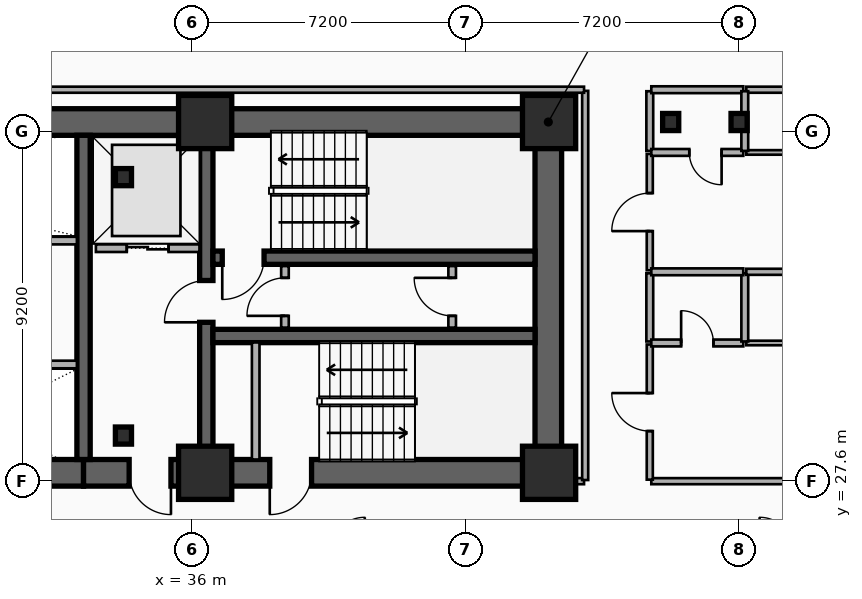
"""IFC4 building model, lengths in metres.
Left out: names, types, materials, properties, quantities, classifications, styles, units other than length and angle.
Written with IfcOpenShell. Run it as: python <this file> out.ifc"""

import sys

from ifc_helpers import new_model, si_unit, direction, frame, frame_2d, origin, origin_2d, place, context, subcontext, project, spatial, rectangle, i_section, extrude, element, fill, save


model = new_model("IFC4")
c1 = context("Model", 3, precision=1e-05, world=origin(), true_north=direction((0.0, 1.0)))
c2 = subcontext(c1, "Body", "Model", "MODEL_VIEW")
j1 = project(units=[si_unit("LENGTHUNIT", "METRE"), si_unit("PLANEANGLEUNIT", "RADIAN")], contexts=[c1])
p1 = place(None, origin())
s1 = spatial("IfcSite", under=j1, at=p1, CompositionType="ELEMENT")
p2 = place(p1, origin())
s2 = spatial("IfcBuilding", under=s1, at=p2, CompositionType="ELEMENT")
p3 = place(p2, frame((0.0, 0.0, 46.5)))
s3 = spatial("IfcBuildingStorey", under=s2, at=p3, CompositionType="ELEMENT", Elevation=46.5)
p4 = place(p3, frame((12.15, 37.05, 0.0), z_axis=(0.0, 0.0, 1.0), x_axis=(1.0, 0.0, 0.0)))
e1 = element("IfcWall", 1, at=p4, inside=s3, PredefinedType="SHEAR", context=c2, shape_type="SweptSolid", body=[
    extrude(rectangle(XDim=33.23, YDim=0.7, at=frame_2d((16.615, 0.0))), origin(), (0.0, 0.0, 1.0), 3.5),
])
p5 = place(p3, frame((33.15, 27.82, 0.0), z_axis=(0.0, 0.0, 1.0), x_axis=(-1.0, 0.0, 0.0)))
e2 = element("IfcWall", 2, at=p5, inside=s3, PredefinedType="SHEAR", context=c2, shape_type="SweptSolid", body=[
    extrude(rectangle(XDim=11.97, YDim=0.7, at=frame_2d((5.985, 0.0))), origin(), (0.0, 0.0, 1.0), 3.5),
])
p6 = place(p5, frame((6.1, 0.0, 0.0)))
e3 = element("IfcOpeningElement", 3, at=p6, cuts=e2, PredefinedType="OPENING", context=c2, shape_type="SweptSolid", body=[
    extrude(rectangle(XDim=1.6, YDim=2.2, at=frame_2d((0.8, 1.1))), frame((0.0, 0.36, 0.0), z_axis=(0.0, -1.0, 0.0), x_axis=(1.0, 0.0, 0.0)), (0.0, 0.0, 1.0), 0.72),
])
p7 = place(p3, frame((45.38, 27.82, 0.0), z_axis=(0.0, 0.0, 1.0), x_axis=(-1.0, 0.0, 0.0)))
e4 = element("IfcWall", 4, at=p7, inside=s3, PredefinedType="SHEAR", context=c2, shape_type="SweptSolid", body=[
    extrude(rectangle(XDim=12.23, YDim=0.7, at=frame_2d((6.115, 0.0))), origin(), (0.0, 0.0, 1.0), 3.5),
])
p8 = place(p7, frame((9.93, 0.0, 0.0)))
e5 = element("IfcOpeningElement", 5, at=p8, cuts=e4, PredefinedType="OPENING", context=c2, shape_type="SweptSolid", body=[
    extrude(rectangle(XDim=1.1, YDim=2.15, at=frame_2d((0.55, 1.075))), frame((0.0, 0.36, 0.0), z_axis=(0.0, -1.0, 0.0), x_axis=(1.0, 0.0, 0.0)), (0.0, 0.0, 1.0), 0.72),
])
p9 = place(p7, frame((6.23, 0.0, 0.0)))
e6 = element("IfcOpeningElement", 6, at=p9, cuts=e4, PredefinedType="OPENING", context=c2, shape_type="SweptSolid", body=[
    extrude(rectangle(XDim=1.1, YDim=2.15, at=frame_2d((0.55, 1.075))), frame((0.0, 0.36, 0.0), z_axis=(0.0, -1.0, 0.0), x_axis=(1.0, 0.0, 0.0)), (0.0, 0.0, 1.0), 0.72),
])
p10 = place(p3, frame((45.38, 28.17, 0.0), z_axis=(0.0, 0.0, 1.0), x_axis=(0.0, 1.0, 0.0)))
e7 = element("IfcWall", 7, at=p10, inside=s3, PredefinedType="SHEAR", context=c2, shape_type="SweptSolid", body=[
    extrude(rectangle(XDim=8.53, YDim=0.7, at=frame_2d((4.265, 0.0))), origin(), (0.0, 0.0, 1.0), 3.5),
])
p11 = place(p3, frame((33.15, 28.17, 0.0), z_axis=(0.0, 0.0, 1.0), x_axis=(0.0, 1.0, 0.0)))
e8 = element("IfcWall", 8, at=p11, inside=s3, PredefinedType="SHEAR", context=c2, shape_type="SweptSolid", body=[
    extrude(rectangle(XDim=8.53, YDim=0.35, at=frame_2d((4.265, 0.0))), origin(), (0.0, 0.0, 1.0), 3.5),
])
p12 = place(p3, frame((36.38, 28.17, 0.0), z_axis=(0.0, 0.0, 1.0), x_axis=(0.0, 1.0, 0.0)))
e9 = element("IfcWall", 9, at=p12, inside=s3, PredefinedType="SHEAR", context=c2, shape_type="SweptSolid", body=[
    extrude(rectangle(XDim=8.53, YDim=0.35, at=frame_2d((4.265, 0.0))), origin(), (0.0, 0.0, 1.0), 3.5),
])
p13 = place(p12, frame((3.61, 0.0, 0.0)))
e10 = element("IfcOpeningElement", 10, at=p13, cuts=e9, PredefinedType="OPENING", context=c2, shape_type="SweptSolid", body=[
    extrude(rectangle(XDim=1.1, YDim=2.15, at=frame_2d((0.55, 1.075))), frame((0.0, 0.185, 0.0), z_axis=(0.0, -1.0, 0.0), x_axis=(1.0, 0.0, 0.0)), (0.0, 0.0, 1.0), 0.37),
])
p14 = place(p3, frame((45.03, 33.48, 0.0), z_axis=(0.0, 0.0, 1.0), x_axis=(-1.0, 0.0, 0.0)))
e11 = element("IfcWall", 11, at=p14, inside=s3, PredefinedType="SHEAR", context=c2, shape_type="SweptSolid", body=[
    extrude(rectangle(XDim=8.475, YDim=0.35, at=frame_2d((4.238, 0.0))), origin(), (0.0, 0.0, 1.0), 3.5),
])
p15 = place(p14, frame((7.13, 0.0, 0.0)))
e12 = element("IfcOpeningElement", 12, at=p15, cuts=e11, PredefinedType="OPENING", context=c2, shape_type="SweptSolid", body=[
    extrude(rectangle(XDim=1.1, YDim=2.15, at=frame_2d((0.55, 1.075))), frame((0.0, 0.185, 0.0), z_axis=(0.0, -1.0, 0.0), x_axis=(1.0, 0.0, 0.0)), (0.0, 0.0, 1.0), 0.37),
])
p16 = place(p3, frame((36.555, 31.42, 0.0), z_axis=(0.0, 0.0, 1.0), x_axis=(1.0, 0.0, 0.0)))
e13 = element("IfcWall", 13, at=p16, inside=s3, PredefinedType="SHEAR", context=c2, shape_type="SweptSolid", body=[
    extrude(rectangle(XDim=8.475, YDim=0.35, at=frame_2d((4.238, 0.0))), origin(), (0.0, 0.0, 1.0), 3.5),
])
for number, where, z_axis, x_axis in (
    (14, (34.2, 28.8, 0.0), (0.0, 0.0, 1.0), (1.0, 0.0, 0.0)),
    (15, (34.2, 35.6, 0.0), (0.0, 0.0, 1.0), (1.0, 0.0, 0.0)),
):
    element("IfcColumn", number, at=place(p3, frame(where, z_axis=z_axis, x_axis=x_axis)), inside=s3, PredefinedType="COLUMN", context=c2, shape_type="SweptSolid", body=[
        extrude(i_section(OverallWidth=0.424, OverallDepth=0.45, WebThickness=0.041, FlangeThickness=0.065, FilletRadius=0.015, at=origin_2d()), origin(), (0.0, 0.0, 1.0), 3.5),
    ])
for number, where, z_axis, x_axis in (
    (16, (36.35, 27.82, 0.0), (0.0, 0.0, 1.0), (1.0, 0.0, 0.0)),
    (17, (36.35, 37.05, 0.0), (0.0, 0.0, 1.0), (1.0, 0.0, 0.0)),
    (18, (45.4, 27.82, 0.0), (0.0, 0.0, 1.0), (1.0, 0.0, 0.0)),
    (19, (45.4, 37.05, 0.0), (0.0, 0.0, 1.0), (1.0, 0.0, 0.0)),
):
    element("IfcColumn", number, at=place(p3, frame(where, z_axis=z_axis, x_axis=x_axis)), inside=s3, PredefinedType="COLUMN", context=c2, shape_type="SweptSolid", body=[
        extrude(rectangle(XDim=1.4, YDim=1.4, at=origin_2d()), origin(), (0.0, 0.0, 1.0), 3.5),
    ])
for number, where, z_axis, x_axis in (
    (20, (48.6, 37.05, 0.0), (0.0, 0.0, 1.0), (1.0, 0.0, 0.0)),
    (21, (50.4, 37.05, 0.0), (0.0, 0.0, 1.0), (1.0, 0.0, 0.0)),
):
    element("IfcColumn", number, at=place(p3, frame(where, z_axis=z_axis, x_axis=x_axis)), inside=s3, PredefinedType="COLUMN", context=c2, shape_type="SweptSolid", body=[
        extrude(i_section(OverallWidth=0.424, OverallDepth=0.45, WebThickness=0.041, FlangeThickness=0.065, FilletRadius=0.015, at=origin_2d()), origin(), (0.0, 0.0, 1.0), 3.5),
    ])
p17 = place(p3, frame((33.475, 33.73, 0.0), z_axis=(0.0, 0.0, 1.0), x_axis=(1.0, 0.0, 0.0)))
e22 = element("IfcWall", 22, at=p17, inside=s3, PredefinedType="PARTITIONING", context=c2, shape_type="SweptSolid", body=[
    extrude(rectangle(XDim=2.725, YDim=0.2, at=frame_2d((1.362, 0.0))), origin(), (0.0, 0.0, 1.0), 2.212),
])
p18 = place(p17, frame((0.812, 0.0, 0.0)))
e23 = element("IfcOpeningElement", 23, at=p18, cuts=e22, PredefinedType="OPENING", context=c2, shape_type="SweptSolid", body=[
    extrude(rectangle(XDim=1.1, YDim=2.15, at=frame_2d((0.55, 1.075))), frame((0.0, 0.11, 0.0), z_axis=(0.0, -1.0, 0.0), x_axis=(1.0, 0.0, 0.0)), (0.0, 0.0, 1.0), 0.22),
])
p19 = place(p3, frame((31.775, 30.67, 0.0), z_axis=(0.0, 0.0, 1.0), x_axis=(1.0, 0.0, 0.0)))
e24 = element("IfcWall", 24, at=p19, inside=s3, PredefinedType="PARTITIONING", context=c2, shape_type="SweptSolid", body=[
    extrude(rectangle(XDim=1.2, YDim=0.2, at=frame_2d((0.6, 0.0))), origin(), (0.0, 0.0, 1.0), 2.62),
])
p20 = place(p3, frame((31.775, 33.93, 0.0), z_axis=(0.0, 0.0, 1.0), x_axis=(1.0, 0.0, 0.0)))
e25 = element("IfcWall", 25, at=p20, inside=s3, PredefinedType="PARTITIONING", context=c2, shape_type="SweptSolid", body=[
    extrude(rectangle(XDim=1.2, YDim=0.2, at=frame_2d((0.6, 0.0))), origin(), (0.0, 0.0, 1.0), 3.24),
])
p21 = place(p3, frame((37.68, 28.17, 0.0), z_axis=(0.0, 0.0, 1.0), x_axis=(0.0, 1.0, 0.0)))
e26 = element("IfcWall", 26, at=p21, inside=s3, PredefinedType="PARTITIONING", context=c2, shape_type="SweptSolid", body=[
    extrude(rectangle(XDim=3.08, YDim=0.2, at=frame_2d((1.54, 0.0))), origin(), (0.0, 0.0, 1.0), 2.62),
])
p22 = place(p3, frame((38.45, 31.64, 0.0), z_axis=(0.0, 0.0, 1.0), x_axis=(0.0, 1.0, 0.0)))
e27 = element("IfcWall", 27, at=p22, inside=s3, PredefinedType="PARTITIONING", context=c2, shape_type="SweptSolid", body=[
    extrude(rectangle(XDim=1.62, YDim=0.2, at=frame_2d((0.81, 0.0))), origin(), (0.0, 0.0, 1.0), 3.24),
])
p23 = place(p22, frame((0.31, 0.0, 0.0)))
e28 = element("IfcOpeningElement", 28, at=p23, cuts=e27, PredefinedType="OPENING", context=c2, shape_type="SweptSolid", body=[
    extrude(rectangle(XDim=1.0, YDim=2.15, at=frame_2d((0.5, 1.075))), frame((0.0, 0.11, 0.0), z_axis=(0.0, -1.0, 0.0), x_axis=(1.0, 0.0, 0.0)), (0.0, 0.0, 1.0), 0.22),
])
p24 = place(p3, frame((42.85, 31.64, 0.0), z_axis=(0.0, 0.0, 1.0), x_axis=(0.0, 1.0, 0.0)))
e29 = element("IfcWall", 29, at=p24, inside=s3, PredefinedType="PARTITIONING", context=c2, shape_type="SweptSolid", body=[
    extrude(rectangle(XDim=1.62, YDim=0.2, at=frame_2d((0.81, 0.0))), origin(), (0.0, 0.0, 1.0), 3.24),
])
p25 = place(p24, frame((0.31, 0.0, 0.0)))
e30 = element("IfcOpeningElement", 30, at=p25, cuts=e29, PredefinedType="OPENING", context=c2, shape_type="SweptSolid", body=[
    extrude(rectangle(XDim=1.0, YDim=2.15, at=frame_2d((0.5, 1.075))), frame((0.0, 0.11, 0.0), z_axis=(0.0, -1.0, 0.0), x_axis=(1.0, 0.0, 0.0)), (0.0, 0.0, 1.0), 0.22),
])
p26 = place(p3, frame((48.09, 27.6, 0.0), z_axis=(0.0, 0.0, 1.0), x_axis=(1.0, 0.0, 0.0)))
e31 = element("IfcWall", 31, at=p26, inside=s3, PredefinedType="PARTITIONING", context=c2, shape_type="SweptSolid", body=[
    extrude(rectangle(XDim=9.25, YDim=0.16, at=frame_2d((4.625, 0.0))), origin(), (0.0, 0.0, 1.0), 2.57),
])
p27 = place(p26, frame((4.125, 0.0, 0.0)))
e32 = element("IfcOpeningElement", 32, at=p27, cuts=e31, PredefinedType="OPENING", context=c2, shape_type="SweptSolid", body=[
    extrude(rectangle(XDim=1.0, YDim=2.15, at=frame_2d((0.5, 1.075))), frame((0.0, 0.09, 0.0), z_axis=(0.0, -1.0, 0.0), x_axis=(1.0, 0.0, 0.0)), (0.0, 0.0, 1.0), 0.18),
])
p28 = place(p3, frame((48.05, 27.64, 0.0), z_axis=(0.0, 0.0, 1.0), x_axis=(0.0, 1.0, 0.0)))
e33 = element("IfcWall", 33, at=p28, inside=s3, PredefinedType="PARTITIONING", context=c2, shape_type="SweptSolid", body=[
    extrude(rectangle(XDim=3.556, YDim=0.16, at=frame_2d((1.778, 0.0))), origin(), (0.0, 0.0, 1.0), 3.24),
])
p29 = place(p28, frame((1.278, 0.0, 0.0)))
e34 = element("IfcOpeningElement", 34, at=p29, cuts=e33, PredefinedType="OPENING", context=c2, shape_type="SweptSolid", body=[
    extrude(rectangle(XDim=1.0, YDim=2.15, at=frame_2d((0.5, 1.075))), frame((0.0, 0.09, 0.0), z_axis=(0.0, -1.0, 0.0), x_axis=(1.0, 0.0, 0.0)), (0.0, 0.0, 1.0), 0.18),
])
p30 = place(p3, frame((48.05, 31.276, 0.0), z_axis=(0.0, 0.0, 1.0), x_axis=(0.0, 1.0, 0.0)))
e35 = element("IfcWall", 35, at=p30, inside=s3, PredefinedType="PLUMBINGWALL", context=c2, shape_type="SweptSolid", body=[
    extrude(rectangle(XDim=1.793, YDim=0.18, at=frame_2d((0.896, 0.0))), origin(), (0.0, 0.0, 1.0), 3.24),
])
p31 = place(p3, frame((48.05, 33.149, 0.0), z_axis=(0.0, 0.0, 1.0), x_axis=(0.0, 1.0, 0.0)))
e36 = element("IfcWall", 36, at=p31, inside=s3, PredefinedType="PARTITIONING", context=c2, shape_type="SweptSolid", body=[
    extrude(rectangle(XDim=3.061, YDim=0.16, at=frame_2d((1.531, 0.0))), origin(), (0.0, 0.0, 1.0), 3.24),
])
p32 = place(p31, frame((1.031, 0.0, 0.0)))
e37 = element("IfcOpeningElement", 37, at=p32, cuts=e36, PredefinedType="OPENING", context=c2, shape_type="SweptSolid", body=[
    extrude(rectangle(XDim=1.0, YDim=2.15, at=frame_2d((0.5, 1.075))), frame((0.0, 0.09, 0.0), z_axis=(0.0, -1.0, 0.0), x_axis=(1.0, 0.0, 0.0)), (0.0, 0.0, 1.0), 0.18),
])
p33 = place(p3, frame((48.05, 36.29, 0.0), z_axis=(0.0, 0.0, 1.0), x_axis=(0.0, 1.0, 0.0)))
e38 = element("IfcWall", 38, at=p33, inside=s3, PredefinedType="PLUMBINGWALL", context=c2, shape_type="SweptSolid", body=[
    extrude(rectangle(XDim=1.57, YDim=0.18, at=frame_2d((0.785, 0.0))), origin(), (0.0, 0.0, 1.0), 2.72),
])
p34 = place(p3, frame((48.09, 37.9, 0.0), z_axis=(0.0, 0.0, 1.0), x_axis=(1.0, 0.0, 0.0)))
e39 = element("IfcWall", 39, at=p34, inside=s3, PredefinedType="PLUMBINGWALL", context=c2, shape_type="SweptSolid", body=[
    extrude(rectangle(XDim=2.42, YDim=0.18, at=frame_2d((1.21, 0.0))), origin(), (0.0, 0.0, 1.0), 3.24),
])
p35 = place(p3, frame((50.59, 37.9, 0.0), z_axis=(0.0, 0.0, 1.0), x_axis=(1.0, 0.0, 0.0)))
e40 = element("IfcWall", 40, at=p35, inside=s3, PredefinedType="PARTITIONING", context=c2, shape_type="SweptSolid", body=[
    extrude(rectangle(XDim=6.75, YDim=0.16, at=frame_2d((3.375, 0.0))), origin(), (0.0, 0.0, 1.0), 3.24),
])
p36 = place(p3, frame((48.09, 31.236, 0.0), z_axis=(0.0, 0.0, 1.0), x_axis=(1.0, 0.0, 0.0)))
e41 = element("IfcWall", 41, at=p36, inside=s3, PredefinedType="PLUMBINGWALL", context=c2, shape_type="SweptSolid", body=[
    extrude(rectangle(XDim=2.42, YDim=0.18, at=frame_2d((1.21, 0.0))), origin(), (0.0, 0.0, 1.0), 2.57),
])
p37 = place(p36, frame((0.785, 0.0, 0.0)))
e42 = element("IfcOpeningElement", 42, at=p37, cuts=e41, PredefinedType="OPENING", context=c2, shape_type="SweptSolid", body=[
    extrude(rectangle(XDim=0.85, YDim=2.1, at=frame_2d((0.425, 1.05))), frame((0.0, 0.1, 0.0), z_axis=(0.0, -1.0, 0.0), x_axis=(1.0, 0.0, 0.0)), (0.0, 0.0, 1.0), 0.2),
])
p38 = place(p3, frame((50.59, 31.236, 0.0), z_axis=(0.0, 0.0, 1.0), x_axis=(1.0, 0.0, 0.0)))
e43 = element("IfcWall", 43, at=p38, inside=s3, PredefinedType="PARTITIONING", context=c2, shape_type="SweptSolid", body=[
    extrude(rectangle(XDim=6.75, YDim=0.12, at=frame_2d((3.375, 0.0))), origin(), (0.0, 0.0, 1.0), 2.57),
])
p39 = place(p38, frame((2.925, 0.0, 0.0)))
e44 = element("IfcOpeningElement", 44, at=p39, cuts=e43, PredefinedType="OPENING", context=c2, shape_type="SweptSolid", body=[
    extrude(rectangle(XDim=0.9, YDim=2.1, at=frame_2d((0.45, 1.05))), frame((0.0, 0.07, 0.0), z_axis=(0.0, -1.0, 0.0), x_axis=(1.0, 0.0, 0.0)), (0.0, 0.0, 1.0), 0.14),
])
p40 = place(p3, frame((50.55, 31.276, 0.0), z_axis=(0.0, 0.0, 1.0), x_axis=(0.0, 1.0, 0.0)))
e45 = element("IfcWall", 45, at=p40, inside=s3, PredefinedType="PLUMBINGWALL", context=c2, shape_type="SweptSolid", body=[
    extrude(rectangle(XDim=1.793, YDim=0.18, at=frame_2d((0.896, 0.0))), origin(), (0.0, 0.0, 1.0), 2.57),
])
p41 = place(p3, frame((48.09, 33.109, 0.0), z_axis=(0.0, 0.0, 1.0), x_axis=(1.0, 0.0, 0.0)))
e46 = element("IfcWall", 46, at=p41, inside=s3, PredefinedType="PLUMBINGWALL", context=c2, shape_type="SweptSolid", body=[
    extrude(rectangle(XDim=2.42, YDim=0.18, at=frame_2d((1.21, 0.0))), origin(), (0.0, 0.0, 1.0), 2.57),
])
p42 = place(p3, frame((50.59, 33.109, 0.0), z_axis=(0.0, 0.0, 1.0), x_axis=(1.0, 0.0, 0.0)))
e47 = element("IfcWall", 47, at=p42, inside=s3, PredefinedType="PARTITIONING", context=c2, shape_type="SweptSolid", body=[
    extrude(rectangle(XDim=6.75, YDim=0.16, at=frame_2d((3.375, 0.0))), origin(), (0.0, 0.0, 1.0), 2.57),
])
p43 = place(p3, frame((50.51, 36.25, 0.0), z_axis=(0.0, 0.0, 1.0), x_axis=(-1.0, 0.0, 0.0)))
e48 = element("IfcWall", 48, at=p43, inside=s3, PredefinedType="PLUMBINGWALL", context=c2, shape_type="SweptSolid", body=[
    extrude(rectangle(XDim=2.42, YDim=0.18, at=frame_2d((1.21, 0.0))), origin(), (0.0, 0.0, 1.0), 2.57),
])
p44 = place(p43, frame((0.57, 0.0, 0.0)))
e49 = element("IfcOpeningElement", 49, at=p44, cuts=e48, PredefinedType="OPENING", context=c2, shape_type="SweptSolid", body=[
    extrude(rectangle(XDim=0.85, YDim=2.1, at=frame_2d((0.425, 1.05))), frame((0.0, 0.1, 0.0), z_axis=(0.0, -1.0, 0.0), x_axis=(1.0, 0.0, 0.0)), (0.0, 0.0, 1.0), 0.2),
])
p45 = place(p3, frame((50.59, 36.25, 0.0), z_axis=(0.0, 0.0, 1.0), x_axis=(1.0, 0.0, 0.0)))
e50 = element("IfcWall", 50, at=p45, inside=s3, PredefinedType="PARTITIONING", context=c2, shape_type="SweptSolid", body=[
    extrude(rectangle(XDim=6.75, YDim=0.12, at=frame_2d((3.375, 0.0))), origin(), (0.0, 0.0, 1.0), 2.57),
])
p46 = place(p45, frame((2.925, 0.0, 0.0)))
e51 = element("IfcOpeningElement", 51, at=p46, cuts=e50, PredefinedType="OPENING", context=c2, shape_type="SweptSolid", body=[
    extrude(rectangle(XDim=0.9, YDim=2.1, at=frame_2d((0.45, 1.05))), frame((0.0, 0.07, 0.0), z_axis=(0.0, -1.0, 0.0), x_axis=(1.0, 0.0, 0.0)), (0.0, 0.0, 1.0), 0.14),
])
p47 = place(p3, frame((50.55, 36.29, 0.0), z_axis=(0.0, 0.0, 1.0), x_axis=(0.0, 1.0, 0.0)))
e52 = element("IfcWall", 52, at=p47, inside=s3, PredefinedType="PLUMBINGWALL", context=c2, shape_type="SweptSolid", body=[
    extrude(rectangle(XDim=1.57, YDim=0.18, at=frame_2d((0.785, 0.0))), origin(), (0.0, 0.0, 1.0), 2.57),
])
p48 = place(p3, frame((45.41, 27.6, 0.0), z_axis=(0.0, 0.0, 1.0), x_axis=(1.0, 0.0, 0.0)))
e53 = element("IfcWall", 53, at=p48, inside=s3, PredefinedType="PARTITIONING", context=c2, shape_type="SweptSolid", body=[
    extrude(rectangle(XDim=0.91, YDim=0.16, at=frame_2d((0.455, 0.0))), origin(), (0.0, 0.0, 1.0), 2.28),
])
p49 = place(p3, frame((46.35, 27.63, 0.0), z_axis=(0.0, 0.0, 1.0), x_axis=(0.0, 1.0, 0.0)))
e54 = element("IfcWall", 54, at=p49, inside=s3, PredefinedType="PARTITIONING", context=c2, shape_type="SweptSolid", body=[
    extrude(rectangle(XDim=10.24, YDim=0.16, at=frame_2d((5.12, 0.0))), origin(), (0.0, 0.0, 1.0), 2.72),
])
p50 = place(p3, frame((11.28, 37.9, 0.0), z_axis=(0.0, 0.0, 1.0), x_axis=(1.0, 0.0, 0.0)))
e55 = element("IfcWall", 55, at=p50, inside=s3, PredefinedType="PARTITIONING", context=c2, shape_type="SweptSolid", body=[
    extrude(rectangle(XDim=35.04, YDim=0.16, at=frame_2d((17.52, 0.0))), origin(), (0.0, 0.0, 1.0), 3.24),
])
p51 = place(p18, origin())
e56 = element("IfcDoor", 56, at=p51, inside=s3, OperationType="DOUBLE_DOOR_SLIDING", PredefinedType="DOOR", context=c2, shape_type="SweptSolid", body=[
    extrude(rectangle(XDim=1.1, YDim=2.15, at=frame_2d((0.55, 1.075))), frame((0.0, 0.025, 0.0), z_axis=(0.0, -1.0, 0.0), x_axis=(1.0, 0.0, 0.0)), (0.0, 0.0, 1.0), 0.05),
])
fill(e23, e56)
p52 = place(p15, origin())
e57 = element("IfcDoor", 57, at=p52, inside=s3, OperationType="SINGLE_SWING_RIGHT", PredefinedType="DOOR", context=c2, shape_type="SweptSolid", body=[
    extrude(rectangle(XDim=1.1, YDim=2.15, at=frame_2d((0.55, 1.075))), frame((0.0, 0.025, 0.0), z_axis=(0.0, -1.0, 0.0), x_axis=(1.0, 0.0, 0.0)), (0.0, 0.0, 1.0), 0.05),
])
fill(e12, e57)
p53 = place(p13, origin())
e58 = element("IfcDoor", 58, at=p53, inside=s3, OperationType="SINGLE_SWING_LEFT", PredefinedType="DOOR", context=c2, shape_type="SweptSolid", body=[
    extrude(rectangle(XDim=1.1, YDim=2.15, at=frame_2d((0.55, 1.075))), frame((0.0, 0.025, 0.0), z_axis=(0.0, -1.0, 0.0), x_axis=(1.0, 0.0, 0.0)), (0.0, 0.0, 1.0), 0.05),
])
fill(e10, e58)
p54 = place(p8, origin())
e59 = element("IfcDoor", 59, at=p54, inside=s3, OperationType="SINGLE_SWING_LEFT", PredefinedType="DOOR", context=c2, shape_type="SweptSolid", body=[
    extrude(rectangle(XDim=1.1, YDim=2.15, at=frame_2d((0.55, 1.075))), frame((0.0, 0.025, 0.0), z_axis=(0.0, -1.0, 0.0), x_axis=(1.0, 0.0, 0.0)), (0.0, 0.0, 1.0), 0.05),
])
fill(e5, e59)
p55 = place(p9, origin())
e60 = element("IfcDoor", 60, at=p55, inside=s3, OperationType="SINGLE_SWING_RIGHT", PredefinedType="DOOR", context=c2, shape_type="SweptSolid", body=[
    extrude(rectangle(XDim=1.1, YDim=2.15, at=frame_2d((0.55, 1.075))), frame((0.0, 0.025, 0.0), z_axis=(0.0, -1.0, 0.0), x_axis=(1.0, 0.0, 0.0)), (0.0, 0.0, 1.0), 0.05),
])
fill(e6, e60)
p56 = place(p23, origin())
e61 = element("IfcDoor", 61, at=p56, inside=s3, OperationType="SINGLE_SWING_LEFT", PredefinedType="DOOR", context=c2, shape_type="SweptSolid", body=[
    extrude(rectangle(XDim=1.0, YDim=2.15, at=frame_2d((0.5, 1.075))), frame((0.0, 0.025, 0.0), z_axis=(0.0, -1.0, 0.0), x_axis=(1.0, 0.0, 0.0)), (0.0, 0.0, 1.0), 0.05),
])
fill(e28, e61)
p57 = place(p25, origin())
e62 = element("IfcDoor", 62, at=p57, inside=s3, OperationType="SINGLE_SWING_RIGHT", PredefinedType="DOOR", context=c2, shape_type="SweptSolid", body=[
    extrude(rectangle(XDim=1.0, YDim=2.15, at=frame_2d((0.5, 1.075))), frame((0.0, 0.025, 0.0), z_axis=(0.0, -1.0, 0.0), x_axis=(1.0, 0.0, 0.0)), (0.0, 0.0, 1.0), 0.05),
])
fill(e30, e62)
p58 = place(p29, origin())
e63 = element("IfcDoor", 63, at=p58, inside=s3, OperationType="SINGLE_SWING_RIGHT", PredefinedType="DOOR", context=c2, shape_type="SweptSolid", body=[
    extrude(rectangle(XDim=1.0, YDim=2.15, at=frame_2d((0.5, 1.075))), frame((0.0, 0.025, 0.0), z_axis=(0.0, -1.0, 0.0), x_axis=(1.0, 0.0, 0.0)), (0.0, 0.0, 1.0), 0.05),
])
fill(e34, e63)
p59 = place(p32, origin())
e64 = element("IfcDoor", 64, at=p59, inside=s3, OperationType="SINGLE_SWING_LEFT", PredefinedType="DOOR", context=c2, shape_type="SweptSolid", body=[
    extrude(rectangle(XDim=1.0, YDim=2.15, at=frame_2d((0.5, 1.075))), frame((0.0, 0.025, 0.0), z_axis=(0.0, -1.0, 0.0), x_axis=(1.0, 0.0, 0.0)), (0.0, 0.0, 1.0), 0.05),
])
fill(e37, e64)
p60 = place(p37, origin())
e65 = element("IfcDoor", 65, at=p60, inside=s3, OperationType="SINGLE_SWING_LEFT", PredefinedType="DOOR", context=c2, shape_type="SweptSolid", body=[
    extrude(rectangle(XDim=0.85, YDim=2.1, at=frame_2d((0.425, 1.05))), frame((0.0, 0.025, 0.0), z_axis=(0.0, -1.0, 0.0), x_axis=(1.0, 0.0, 0.0)), (0.0, 0.0, 1.0), 0.05),
])
fill(e42, e65)
p61 = place(p44, origin())
e66 = element("IfcDoor", 66, at=p61, inside=s3, OperationType="SINGLE_SWING_LEFT", PredefinedType="DOOR", context=c2, shape_type="SweptSolid", body=[
    extrude(rectangle(XDim=0.85, YDim=2.1, at=frame_2d((0.425, 1.05))), frame((0.0, 0.025, 0.0), z_axis=(0.0, -1.0, 0.0), x_axis=(1.0, 0.0, 0.0)), (0.0, 0.0, 1.0), 0.05),
])
fill(e49, e66)
save(model, sys.argv[1])
